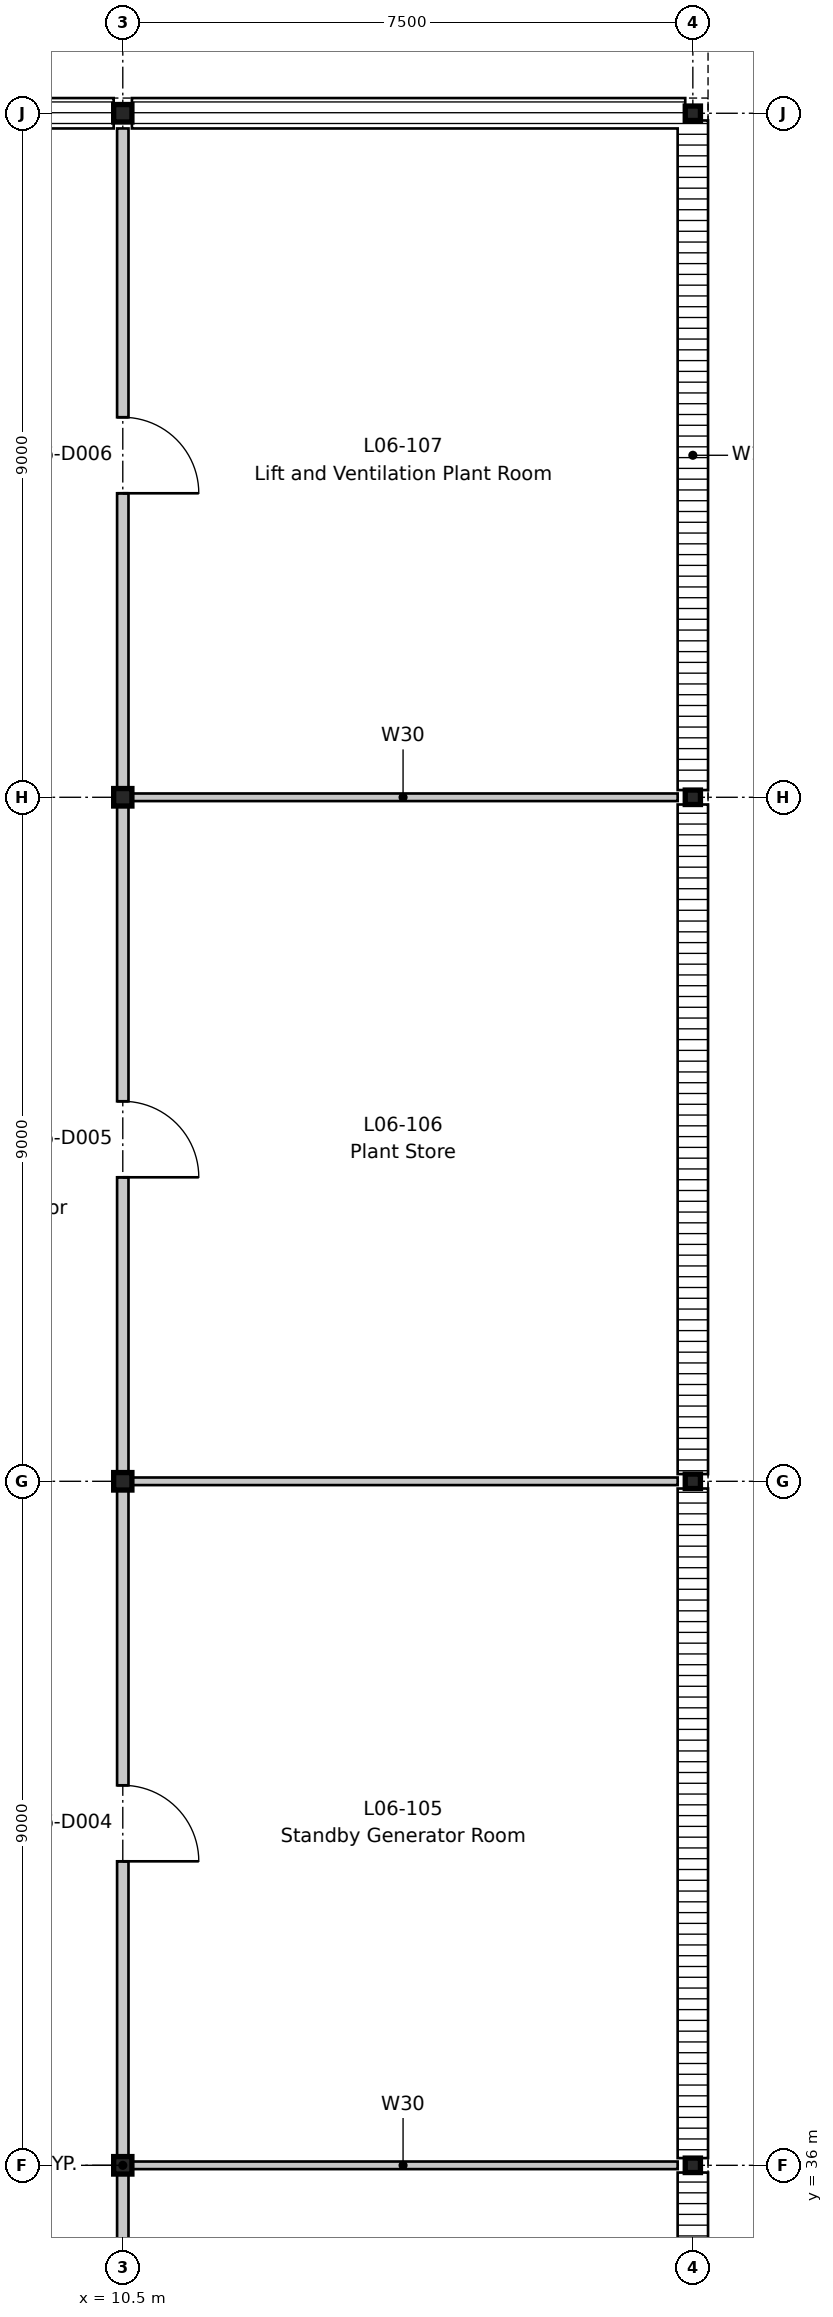
"""IFC4 building model, lengths in metres.
Left out: names, types, materials, properties, quantities, classifications, styles, units other than length and angle.
Written with IfcOpenShell. Run it as: python <this file> out.ifc"""

import sys

from ifc_helpers import new_model, si_unit, direction, frame, frame_2d, origin, origin_2d, place, context, subcontext, project, spatial, rectangle, i_section, extrude, element, fill, save


model = new_model("IFC4")
c1 = context("Model", 3, precision=1e-05, world=origin(), true_north=direction((0.0, 1.0)))
c2 = subcontext(c1, "Body", "Model", "MODEL_VIEW")
j1 = project(units=[si_unit("LENGTHUNIT", "METRE"), si_unit("PLANEANGLEUNIT", "RADIAN")], contexts=[c1])
p1 = place(None, origin())
s1 = spatial("IfcSite", under=j1, at=p1, CompositionType="ELEMENT")
p2 = place(p1, origin())
s2 = spatial("IfcBuilding", under=s1, at=p2, CompositionType="ELEMENT")
p3 = place(p2, frame((0.0, 0.0, 27.0)))
s3 = spatial("IfcBuildingStorey", under=s2, at=p3, CompositionType="ELEMENT", Elevation=27.0)
for number, where, z_axis, x_axis in (
    (1, (10.5, 36.0, -0.25), (0.0, 0.0, 1.0), (1.0, 0.0, 0.0)),
    (2, (10.5, 45.0, -0.25), (0.0, 0.0, 1.0), (1.0, 0.0, 0.0)),
    (3, (10.5, 54.0, -0.25), (0.0, 0.0, 1.0), (1.0, 0.0, 0.0)),
    (4, (10.5, 63.0, -0.25), (0.0, 0.0, 1.0), (1.0, 0.0, 0.0)),
):
    element("IfcColumn", number, at=place(p3, frame(where, z_axis=z_axis, x_axis=x_axis)), inside=s3, PredefinedType="COLUMN", context=c2, shape_type="SweptSolid", body=[
        extrude(i_section(OverallWidth=0.24, OverallDepth=0.23, WebThickness=0.008, FlangeThickness=0.012, FilletRadius=0.021, at=origin_2d()), origin(), (0.0, 0.0, 1.0), 3.6),
    ])
for number, where, z_axis, x_axis in (
    (5, (18.0, 36.0, -0.25), (0.0, 0.0, 1.0), (1.0, 0.0, 0.0)),
    (6, (18.0, 45.0, -0.25), (0.0, 0.0, 1.0), (1.0, 0.0, 0.0)),
    (7, (18.0, 54.0, -0.25), (0.0, 0.0, 1.0), (1.0, 0.0, 0.0)),
    (8, (18.0, 63.0, -0.25), (0.0, 0.0, 1.0), (1.0, 0.0, 0.0)),
):
    element("IfcColumn", number, at=place(p3, frame(where, z_axis=z_axis, x_axis=x_axis)), inside=s3, PredefinedType="COLUMN", context=c2, shape_type="SweptSolid", body=[
        extrude(i_section(OverallWidth=0.2, OverallDepth=0.19, WebThickness=0.007, FlangeThickness=0.01, FilletRadius=0.018, at=origin_2d()), origin(), (0.0, 0.0, 1.0), 3.6),
    ])
for number, where, z_axis, x_axis in (
    (9, (18.0, 35.905, 0.0), (0.0, 0.0, 1.0), (0.0, -1.0, 0.0)),
    (10, (18.0, 44.905, 0.0), (0.0, 0.0, 1.0), (0.0, -1.0, 0.0)),
    (11, (18.0, 53.905, 0.0), (0.0, 0.0, 1.0), (0.0, -1.0, 0.0)),
    (12, (18.0, 62.905, 0.0), (0.0, 0.0, 1.0), (0.0, -1.0, 0.0)),
):
    element("IfcWall", number, at=place(p3, frame(where, z_axis=z_axis, x_axis=x_axis)), inside=s3, PredefinedType="STANDARD", context=c2, shape_type="SweptSolid", body=[
        extrude(rectangle(XDim=8.81, YDim=0.4, at=frame_2d((4.405, 0.0))), origin(), (0.0, 0.0, 1.0), 2.95),
    ])
p4 = place(p3, frame((7.62, 63.0, 0.0), z_axis=(0.0, 0.0, 1.0), x_axis=(1.0, 0.0, 0.0)))
e13 = element("IfcWall", 13, at=p4, inside=s3, PredefinedType="STANDARD", context=c2, shape_type="SweptSolid", body=[
    extrude(rectangle(XDim=2.76, YDim=0.4, at=frame_2d((1.38, 0.0))), origin(), (0.0, 0.0, 1.0), 3.15),
])
p5 = place(p3, frame((10.62, 63.0, 0.0), z_axis=(0.0, 0.0, 1.0), x_axis=(1.0, 0.0, 0.0)))
e14 = element("IfcWall", 14, at=p5, inside=s3, PredefinedType="STANDARD", context=c2, shape_type="SweptSolid", body=[
    extrude(rectangle(XDim=7.28, YDim=0.4, at=frame_2d((3.64, 0.0))), origin(), (0.0, 0.0, 1.0), 3.02),
])
p6 = place(p3, frame((10.5, 27.2, 0.0), z_axis=(0.0, 0.0, 1.0), x_axis=(0.0, 1.0, 0.0)))
e15 = element("IfcWall", 15, at=p6, inside=s3, PredefinedType="PARTITIONING", context=c2, shape_type="SweptSolid", body=[
    extrude(rectangle(XDim=35.6, YDim=0.15, at=frame_2d((17.8, 0.0))), origin(), (0.0, 0.0, 1.0), 2.83),
])
p7 = place(p6, frame((3.8, 0.0, 0.0)))
e16 = element("IfcOpeningElement", 16, at=p7, cuts=e15, PredefinedType="OPENING", context=c2, shape_type="SweptSolid", body=[
    extrude(rectangle(XDim=1.0, YDim=2.1, at=frame_2d((0.5, 1.05))), frame((0.0, 0.085, 0.0), z_axis=(0.0, -1.0, 0.0), x_axis=(1.0, 0.0, 0.0)), (0.0, 0.0, 1.0), 0.17),
])
p8 = place(p6, frame((12.8, 0.0, 0.0)))
e17 = element("IfcOpeningElement", 17, at=p8, cuts=e15, PredefinedType="OPENING", context=c2, shape_type="SweptSolid", body=[
    extrude(rectangle(XDim=1.0, YDim=2.1, at=frame_2d((0.5, 1.05))), frame((0.0, 0.085, 0.0), z_axis=(0.0, -1.0, 0.0), x_axis=(1.0, 0.0, 0.0)), (0.0, 0.0, 1.0), 0.17),
])
p9 = place(p6, frame((21.8, 0.0, 0.0)))
e18 = element("IfcOpeningElement", 18, at=p9, cuts=e15, PredefinedType="OPENING", context=c2, shape_type="SweptSolid", body=[
    extrude(rectangle(XDim=1.0, YDim=2.1, at=frame_2d((0.5, 1.05))), frame((0.0, 0.085, 0.0), z_axis=(0.0, -1.0, 0.0), x_axis=(1.0, 0.0, 0.0)), (0.0, 0.0, 1.0), 0.17),
])
p10 = place(p6, frame((30.8, 0.0, 0.0)))
e19 = element("IfcOpeningElement", 19, at=p10, cuts=e15, PredefinedType="OPENING", context=c2, shape_type="SweptSolid", body=[
    extrude(rectangle(XDim=1.0, YDim=2.1, at=frame_2d((0.5, 1.05))), frame((0.0, 0.085, 0.0), z_axis=(0.0, -1.0, 0.0), x_axis=(1.0, 0.0, 0.0)), (0.0, 0.0, 1.0), 0.17),
])
for number, where, z_axis, x_axis in (
    (20, (10.575, 36.0, 0.0), (0.0, 0.0, 1.0), (1.0, 0.0, 0.0)),
    (21, (10.575, 45.0, 0.0), (0.0, 0.0, 1.0), (1.0, 0.0, 0.0)),
    (22, (10.575, 54.0, 0.0), (0.0, 0.0, 1.0), (1.0, 0.0, 0.0)),
):
    element("IfcWall", number, at=place(p3, frame(where, z_axis=z_axis, x_axis=x_axis)), inside=s3, PredefinedType="PARTITIONING", context=c2, shape_type="SweptSolid", body=[
        extrude(rectangle(XDim=7.225, YDim=0.1, at=frame_2d((3.613, 0.0))), origin(), (0.0, 0.0, 1.0), 3.0),
    ])
p11 = place(p8, frame((1.0, 0.0, 0.0), z_axis=(0.0, 0.0, 1.0), x_axis=(-1.0, 0.0, 0.0)))
e23 = element("IfcDoor", 23, at=p11, inside=s3, OperationType="SINGLE_SWING_RIGHT", PredefinedType="DOOR", context=c2, shape_type="SweptSolid", body=[
    extrude(rectangle(XDim=1.0, YDim=2.1, at=frame_2d((0.5, 1.05))), frame((0.0, 0.025, 0.0), z_axis=(0.0, -1.0, 0.0), x_axis=(1.0, 0.0, 0.0)), (0.0, 0.0, 1.0), 0.05),
])
fill(e17, e23)
p12 = place(p9, frame((1.0, 0.0, 0.0), z_axis=(0.0, 0.0, 1.0), x_axis=(-1.0, 0.0, 0.0)))
e24 = element("IfcDoor", 24, at=p12, inside=s3, OperationType="SINGLE_SWING_RIGHT", PredefinedType="DOOR", context=c2, shape_type="SweptSolid", body=[
    extrude(rectangle(XDim=1.0, YDim=2.1, at=frame_2d((0.5, 1.05))), frame((0.0, 0.025, 0.0), z_axis=(0.0, -1.0, 0.0), x_axis=(1.0, 0.0, 0.0)), (0.0, 0.0, 1.0), 0.05),
])
fill(e18, e24)
p13 = place(p10, frame((1.0, 0.0, 0.0), z_axis=(0.0, 0.0, 1.0), x_axis=(-1.0, 0.0, 0.0)))
e25 = element("IfcDoor", 25, at=p13, inside=s3, OperationType="SINGLE_SWING_RIGHT", PredefinedType="DOOR", context=c2, shape_type="SweptSolid", body=[
    extrude(rectangle(XDim=1.0, YDim=2.1, at=frame_2d((0.5, 1.05))), frame((0.0, 0.025, 0.0), z_axis=(0.0, -1.0, 0.0), x_axis=(1.0, 0.0, 0.0)), (0.0, 0.0, 1.0), 0.05),
])
fill(e19, e25)
save(model, sys.argv[1])
